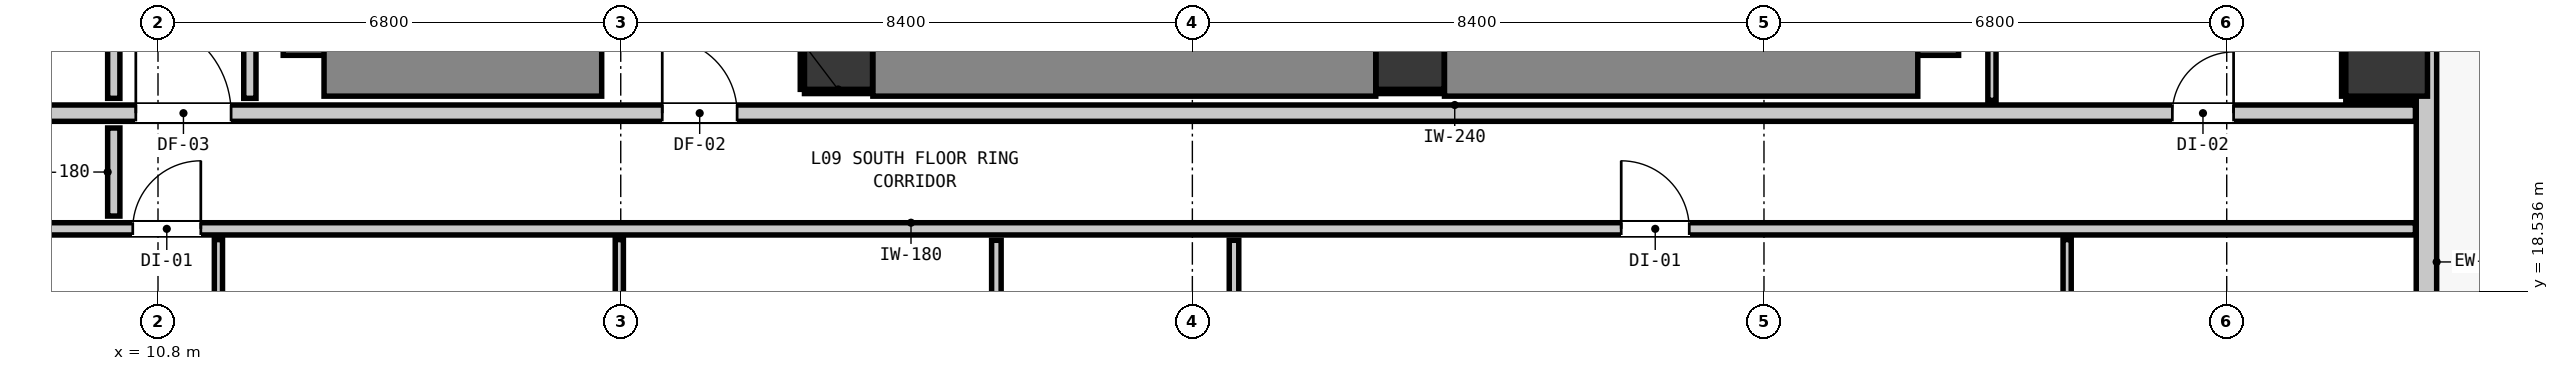
"""IFC4 building model, lengths in metres.
Left out: names, types, materials, properties, quantities, classifications, styles, units other than length and angle.
Written with IfcOpenShell. Run it as: python <this file> out.ifc"""

import sys

from ifc_helpers import new_model, si_unit, direction, frame, frame_2d, origin, origin_2d, place, context, subcontext, project, spatial, rectangle, extrude, element, fill, save


model = new_model("IFC4")
c1 = context("Model", 3, precision=1e-05, world=origin(), true_north=direction((0.0, 1.0)))
c2 = subcontext(c1, "Body", "Model", "MODEL_VIEW")
j1 = project(units=[si_unit("LENGTHUNIT", "METRE"), si_unit("PLANEANGLEUNIT", "RADIAN")], contexts=[c1])
p1 = place(None, origin())
s1 = spatial("IfcSite", under=j1, at=p1, CompositionType="ELEMENT")
p2 = place(p1, origin())
s2 = spatial("IfcBuilding", under=s1, at=p2, CompositionType="ELEMENT")
p3 = place(p2, frame((0.0, 0.0, 35.28)))
s3 = spatial("IfcBuildingStorey", under=s2, at=p3, CompositionType="ELEMENT", Elevation=35.28)
for number, where, z_axis, x_axis in (
    (1, (20.8, 22.0, 0.0), (0.0, 0.0, 1.0), (1.0, 0.0, 0.0)),
    (2, (29.2, 22.0, 0.0), (0.0, 0.0, 1.0), (1.0, 0.0, 0.0)),
):
    element("IfcColumn", number, at=place(p3, frame(where, z_axis=z_axis, x_axis=x_axis)), inside=s3, PredefinedType="COLUMN", context=c2, shape_type="SweptSolid", body=[
        extrude(rectangle(XDim=1.0, YDim=1.0, at=origin_2d()), origin(), (0.0, 0.0, 1.0), 3.32),
    ])
p4 = place(p3, frame((13.24, 22.0, 0.0), z_axis=(0.0, 0.0, 1.0), x_axis=(0.0, 1.0, 0.0)))
e3 = element("IfcWall", 3, at=p4, inside=s3, PredefinedType="SHEAR", context=c2, shape_type="SweptSolid", body=[
    extrude(rectangle(XDim=8.195, YDim=1.2, at=frame_2d((4.098, 0.0))), origin(), (0.0, 0.0, 1.0), 3.32),
])
p5 = place(p3, frame((13.24, 22.0, 0.0), z_axis=(0.0, 0.0, 1.0), x_axis=(1.0, 0.0, 0.0)))
e4 = element("IfcWall", 4, at=p5, inside=s3, PredefinedType="SHEAR", context=c2, shape_type="SweptSolid", body=[
    extrude(rectangle(XDim=4.08, YDim=1.2, at=frame_2d((2.04, 0.0))), origin(), (0.0, 0.0, 1.0), 3.32),
])
p6 = place(p3, frame((36.66, 22.0, 0.0), z_axis=(0.0, 0.0, 1.0), x_axis=(0.0, 1.0, 0.0)))
e5 = element("IfcWall", 5, at=p6, inside=s3, PredefinedType="SHEAR", context=c2, shape_type="SweptSolid", body=[
    extrude(rectangle(XDim=8.195, YDim=1.2, at=frame_2d((4.098, 0.0))), origin(), (0.0, 0.0, 1.0), 3.32),
])
p7 = place(p3, frame((29.705, 22.0, 0.0), z_axis=(0.0, 0.0, 1.0), x_axis=(1.0, 0.0, 0.0)))
e6 = element("IfcWall", 6, at=p7, inside=s3, PredefinedType="SHEAR", context=c2, shape_type="SweptSolid", body=[
    extrude(rectangle(XDim=6.955, YDim=1.2, at=frame_2d((3.478, 0.0))), origin(), (0.0, 0.0, 1.0), 3.32),
])
p8 = place(p3, frame((21.305, 22.0, 0.0), z_axis=(0.0, 0.0, 1.0), x_axis=(1.0, 0.0, 0.0)))
e7 = element("IfcWall", 7, at=p8, inside=s3, PredefinedType="SHEAR", context=c2, shape_type="SweptSolid", body=[
    extrude(rectangle(XDim=7.39, YDim=1.2, at=frame_2d((3.695, 0.0))), origin(), (0.0, 0.0, 1.0), 3.32),
])
p9 = place(p3, frame((43.55, 22.0, 0.0), z_axis=(0.0, 0.0, 1.0), x_axis=(1.0, 0.0, 0.0)))
e8 = element("IfcColumn", 8, at=p9, inside=s3, PredefinedType="COLUMN", context=c2, shape_type="SweptSolid", body=[
    extrude(rectangle(XDim=1.2, YDim=1.2, at=origin_2d()), origin(), (0.0, 0.0, 1.0), 3.32),
])
p10 = place(p3, frame((44.135, 44.835, 0.0), z_axis=(0.0, 0.0, 1.0), x_axis=(0.0, -1.0, 0.0)))
e9 = element("IfcWall", 9, at=p10, inside=s3, PredefinedType="STANDARD", context=c2, shape_type="SweptSolid", body=[
    extrude(rectangle(XDim=34.67, YDim=0.3, at=frame_2d((17.335, 0.0))), origin(), (0.0, 0.0, 1.0), 3.06),
])
p11 = place(p10, frame((1.251, 0.0, 0.0)))
e10 = element("IfcOpeningElement", 10, at=p11, cuts=e9, PredefinedType="OPENING", context=c2, shape_type="SweptSolid", body=[
    extrude(rectangle(XDim=1.0, YDim=2.15, at=frame_2d((0.5, 1.075))), frame((0.0, 0.16, 0.0), z_axis=(0.0, -1.0, 0.0), x_axis=(1.0, 0.0, 0.0)), (0.0, 0.0, 1.0), 0.32),
])
p12 = place(p10, frame((32.708, 0.0, 0.85)))
e11 = element("IfcOpeningElement", 11, at=p12, cuts=e9, PredefinedType="OPENING", context=c2, shape_type="SweptSolid", body=[
    extrude(rectangle(XDim=1.1, YDim=2.05, at=frame_2d((0.55, 1.025))), frame((0.0, 0.16, 0.0), z_axis=(0.0, -1.0, 0.0), x_axis=(1.0, 0.0, 0.0)), (0.0, 0.0, 1.0), 0.32),
])
p13 = place(p10, frame((17.935, 0.0, 0.85)))
e12 = element("IfcOpeningElement", 12, at=p13, cuts=e9, PredefinedType="OPENING", context=c2, shape_type="SweptSolid", body=[
    extrude(rectangle(XDim=1.1, YDim=2.05, at=frame_2d((0.55, 1.025))), frame((0.0, 0.16, 0.0), z_axis=(0.0, -1.0, 0.0), x_axis=(1.0, 0.0, 0.0)), (0.0, 0.0, 1.0), 0.32),
])
p14 = place(p10, frame((6.959, 0.0, 0.85)))
e13 = element("IfcOpeningElement", 13, at=p14, cuts=e9, PredefinedType="OPENING", context=c2, shape_type="SweptSolid", body=[
    extrude(rectangle(XDim=1.1, YDim=2.05, at=frame_2d((0.55, 1.025))), frame((0.0, 0.16, 0.0), z_axis=(0.0, -1.0, 0.0), x_axis=(1.0, 0.0, 0.0)), (0.0, 0.0, 1.0), 0.32),
])
p15 = place(p3, frame((1.827, 21.15, 0.0), z_axis=(0.0, 0.0, 1.0), x_axis=(1.0, 0.0, 0.0)))
e14 = element("IfcWall", 14, at=p15, inside=s3, PredefinedType="PARTITIONING", context=c2, shape_type="SweptSolid", body=[
    extrude(rectangle(XDim=42.146, YDim=0.24, at=frame_2d((21.073, 0.0))), origin(), (0.0, 0.0, 1.0), 3.06),
])
p16 = place(p15, frame((16.383, 0.0, 0.0)))
e15 = element("IfcOpeningElement", 15, at=p16, cuts=e14, PredefinedType="OPENING", context=c2, shape_type="SweptSolid", body=[
    extrude(rectangle(XDim=1.1, YDim=2.15, at=frame_2d((0.55, 1.075))), frame((0.0, 0.13, 0.0), z_axis=(0.0, -1.0, 0.0), x_axis=(1.0, 0.0, 0.0)), (0.0, 0.0, 1.0), 0.26),
])
p17 = place(p15, frame((8.647, 0.0, 0.0)))
e16 = element("IfcOpeningElement", 16, at=p17, cuts=e14, PredefinedType="OPENING", context=c2, shape_type="SweptSolid", body=[
    extrude(rectangle(XDim=1.4, YDim=2.15, at=frame_2d((0.7, 1.075))), frame((0.0, 0.13, 0.0), z_axis=(0.0, -1.0, 0.0), x_axis=(1.0, 0.0, 0.0)), (0.0, 0.0, 1.0), 0.26),
])
p18 = place(p15, frame((38.574, 0.0, 0.0)))
e17 = element("IfcOpeningElement", 17, at=p18, cuts=e14, PredefinedType="OPENING", context=c2, shape_type="SweptSolid", body=[
    extrude(rectangle(XDim=0.9, YDim=2.1, at=frame_2d((0.45, 1.05))), frame((0.0, 0.13, 0.0), z_axis=(0.0, -1.0, 0.0), x_axis=(1.0, 0.0, 0.0)), (0.0, 0.0, 1.0), 0.26),
])
p19 = place(p3, frame((1.827, 19.45, 0.0), z_axis=(0.0, 0.0, 1.0), x_axis=(1.0, 0.0, 0.0)))
e18 = element("IfcWall", 18, at=p19, inside=s3, PredefinedType="PARTITIONING", context=c2, shape_type="SweptSolid", body=[
    extrude(rectangle(XDim=42.146, YDim=0.18, at=frame_2d((21.073, 0.0))), origin(), (0.0, 0.0, 1.0), 3.06),
])
p20 = place(p19, frame((8.602, 0.0, 0.0)))
e19 = element("IfcOpeningElement", 19, at=p20, cuts=e18, PredefinedType="OPENING", context=c2, shape_type="SweptSolid", body=[
    extrude(rectangle(XDim=1.0, YDim=2.15, at=frame_2d((0.5, 1.075))), frame((0.0, 0.1, 0.0), z_axis=(0.0, -1.0, 0.0), x_axis=(1.0, 0.0, 0.0)), (0.0, 0.0, 1.0), 0.2),
])
p21 = place(p19, frame((30.475, 0.0, 0.0)))
e20 = element("IfcOpeningElement", 20, at=p21, cuts=e18, PredefinedType="OPENING", context=c2, shape_type="SweptSolid", body=[
    extrude(rectangle(XDim=1.0, YDim=2.15, at=frame_2d((0.5, 1.075))), frame((0.0, 0.1, 0.0), z_axis=(0.0, -1.0, 0.0), x_axis=(1.0, 0.0, 0.0)), (0.0, 0.0, 1.0), 0.2),
])
p22 = place(p3, frame((10.15, 19.638, 0.0), z_axis=(0.0, 0.0, 1.0), x_axis=(0.0, 1.0, 0.0)))
e21 = element("IfcWall", 21, at=p22, inside=s3, PredefinedType="PARTITIONING", context=c2, shape_type="SweptSolid", body=[
    extrude(rectangle(XDim=1.294, YDim=0.18, at=frame_2d((0.647, 0.0))), origin(), (0.0, 0.0, 1.0), 3.06),
])
p23 = place(p3, frame((10.15, 21.368, 0.0), z_axis=(0.0, 0.0, 1.0), x_axis=(0.0, 1.0, 0.0)))
e22 = element("IfcWall", 22, at=p23, inside=s3, PredefinedType="PARTITIONING", context=c2, shape_type="SweptSolid", body=[
    extrude(rectangle(XDim=5.354, YDim=0.18, at=frame_2d((2.677, 0.0))), origin(), (0.0, 0.0, 1.0), 3.06),
])
p24 = place(p3, frame((12.15, 21.368, 0.0), z_axis=(0.0, 0.0, 1.0), x_axis=(0.0, 1.0, 0.0)))
e23 = element("IfcWall", 23, at=p24, inside=s3, PredefinedType="PARTITIONING", context=c2, shape_type="SweptSolid", body=[
    extrude(rectangle(XDim=18.694, YDim=0.18, at=frame_2d((9.347, 0.0))), origin(), (0.0, 0.0, 1.0), 3.06),
])
p25 = place(p3, frame((23.12, 13.148, 0.0), z_axis=(0.0, 0.0, 1.0), x_axis=(0.0, 1.0, 0.0)))
e24 = element("IfcWall", 24, at=p25, inside=s3, PredefinedType="PARTITIONING", context=c2, shape_type="SweptSolid", body=[
    extrude(rectangle(XDim=6.134, YDim=0.14, at=frame_2d((3.067, 0.0))), origin(), (0.0, 0.0, 1.0), 3.06),
])
p26 = place(p3, frame((26.612, 13.148, 0.0), z_axis=(0.0, 0.0, 1.0), x_axis=(0.0, 1.0, 0.0)))
e25 = element("IfcWall", 25, at=p26, inside=s3, PredefinedType="PARTITIONING", context=c2, shape_type="SweptSolid", body=[
    extrude(rectangle(XDim=6.134, YDim=0.14, at=frame_2d((3.067, 0.0))), origin(), (0.0, 0.0, 1.0), 3.06),
])
p27 = place(p26, frame((2.647, 0.0, 0.0)))
e26 = element("IfcOpeningElement", 26, at=p27, cuts=e25, PredefinedType="OPENING", context=c2, shape_type="SweptSolid", body=[
    extrude(rectangle(XDim=0.86, YDim=2.02, at=frame_2d((0.43, 1.01))), frame((0.0, 0.08, 0.0), z_axis=(0.0, -1.0, 0.0), x_axis=(1.0, 0.0, 0.0)), (0.0, 0.0, 1.0), 0.16),
])
p28 = place(p3, frame((11.688, 13.138, 0.0), z_axis=(0.0, 0.0, 1.0), x_axis=(0.0, 1.0, 0.0)))
e27 = element("IfcWall", 27, at=p28, inside=s3, PredefinedType="PARTITIONING", context=c2, shape_type="SweptSolid", body=[
    extrude(rectangle(XDim=6.154, YDim=0.12, at=frame_2d((3.077, 0.0))), origin(), (0.0, 0.0, 1.0), 3.06),
])
p29 = place(p28, frame((2.624, 0.0, 0.0)))
e28 = element("IfcOpeningElement", 28, at=p29, cuts=e27, PredefinedType="OPENING", context=c2, shape_type="SweptSolid", body=[
    extrude(rectangle(XDim=0.9, YDim=2.1, at=frame_2d((0.45, 1.05))), frame((0.0, 0.07, 0.0), z_axis=(0.0, -1.0, 0.0), x_axis=(1.0, 0.0, 0.0)), (0.0, 0.0, 1.0), 0.14),
])
p30 = place(p3, frame((17.579, 13.138, 0.0), z_axis=(0.0, 0.0, 1.0), x_axis=(0.0, 1.0, 0.0)))
e29 = element("IfcWall", 29, at=p30, inside=s3, PredefinedType="PARTITIONING", context=c2, shape_type="SweptSolid", body=[
    extrude(rectangle(XDim=6.154, YDim=0.12, at=frame_2d((3.077, 0.0))), origin(), (0.0, 0.0, 1.0), 3.06),
])
p31 = place(p30, frame((2.637, 0.0, 0.0)))
e30 = element("IfcOpeningElement", 30, at=p31, cuts=e29, PredefinedType="OPENING", context=c2, shape_type="SweptSolid", body=[
    extrude(rectangle(XDim=0.9, YDim=2.1, at=frame_2d((0.45, 1.05))), frame((0.0, 0.07, 0.0), z_axis=(0.0, -1.0, 0.0), x_axis=(1.0, 0.0, 0.0)), (0.0, 0.0, 1.0), 0.14),
])
p32 = place(p3, frame((37.75, 21.338, 0.0), z_axis=(0.0, 0.0, 1.0), x_axis=(0.0, 1.0, 0.0)))
e31 = element("IfcWall", 31, at=p32, inside=s3, PredefinedType="PARTITIONING", context=c2, shape_type="SweptSolid", body=[
    extrude(rectangle(XDim=10.124, YDim=0.12, at=frame_2d((5.062, 0.0))), origin(), (0.0, 0.0, 1.0), 3.06),
])
p33 = place(p3, frame((38.855, 13.138, 0.0), z_axis=(0.0, 0.0, 1.0), x_axis=(0.0, 1.0, 0.0)))
e32 = element("IfcWall", 32, at=p33, inside=s3, PredefinedType="PARTITIONING", context=c2, shape_type="SweptSolid", body=[
    extrude(rectangle(XDim=6.154, YDim=0.12, at=frame_2d((3.077, 0.0))), origin(), (0.0, 0.0, 1.0), 2.445),
])
p34 = place(p33, frame((2.637, 0.0, 0.0)))
e33 = element("IfcOpeningElement", 33, at=p34, cuts=e32, PredefinedType="OPENING", context=c2, shape_type="SweptSolid", body=[
    extrude(rectangle(XDim=0.9, YDim=2.1, at=frame_2d((0.45, 1.05))), frame((0.0, 0.07, 0.0), z_axis=(0.0, -1.0, 0.0), x_axis=(1.0, 0.0, 0.0)), (0.0, 0.0, 1.0), 0.14),
])
p35 = place(p3, frame((20.3, 21.468, 0.0), z_axis=(0.0, 0.0, 1.0), x_axis=(1.0, 0.0, 0.0)))
e34 = element("IfcWall", 34, at=p35, inside=s3, PredefinedType="PARTITIONING", context=c2, shape_type="SweptSolid", body=[
    extrude(rectangle(XDim=0.99, YDim=0.06, at=frame_2d((0.495, 0.0))), origin(), (0.0, 0.0, 1.0), 1.45),
])
p36 = place(p3, frame((20.268, 21.5, 0.0), z_axis=(0.0, 0.0, 1.0), x_axis=(0.0, 1.0, 0.0)))
e35 = element("IfcWall", 35, at=p36, inside=s3, PredefinedType="PARTITIONING", context=c2, shape_type="SweptSolid", body=[
    extrude(rectangle(XDim=1.0, YDim=0.06, at=frame_2d((0.5, 0.0))), origin(), (0.0, 0.0, 1.0), 1.45),
])
p37 = place(p3, frame((28.71, 21.468, 0.0), z_axis=(0.0, 0.0, 1.0), x_axis=(1.0, 0.0, 0.0)))
e36 = element("IfcWall", 36, at=p37, inside=s3, PredefinedType="PARTITIONING", context=c2, shape_type="SweptSolid", body=[
    extrude(rectangle(XDim=0.98, YDim=0.06, at=frame_2d((0.49, 0.0))), origin(), (0.0, 0.0, 1.0), 1.45),
])
p38 = place(p3, frame((42.95, 21.368, 0.0), z_axis=(0.0, 0.0, 1.0), x_axis=(1.0, 0.0, 0.0)))
e37 = element("IfcWall", 37, at=p38, inside=s3, PredefinedType="PARTITIONING", context=c2, shape_type="SweptSolid", body=[
    extrude(rectangle(XDim=1.02, YDim=0.06, at=frame_2d((0.51, 0.0))), origin(), (0.0, 0.0, 1.0), 1.45),
])
p39 = place(p3, frame((42.918, 21.4, 0.0), z_axis=(0.0, 0.0, 1.0), x_axis=(0.0, 1.0, 0.0)))
e38 = element("IfcWall", 38, at=p39, inside=s3, PredefinedType="PARTITIONING", context=c2, shape_type="SweptSolid", body=[
    extrude(rectangle(XDim=1.2, YDim=0.06, at=frame_2d((0.6, 0.0))), origin(), (0.0, 0.0, 1.0), 1.45),
])
p40 = place(p16, origin())
e39 = element("IfcDoor", 39, at=p40, inside=s3, OperationType="SINGLE_SWING_LEFT", PredefinedType="DOOR", context=c2, shape_type="SweptSolid", body=[
    extrude(rectangle(XDim=1.1, YDim=2.15, at=frame_2d((0.55, 1.075))), frame((0.0, 0.025, 0.0), z_axis=(0.0, -1.0, 0.0), x_axis=(1.0, 0.0, 0.0)), (0.0, 0.0, 1.0), 0.05),
])
fill(e15, e39)
p41 = place(p17, origin())
e40 = element("IfcDoor", 40, at=p41, inside=s3, OperationType="SINGLE_SWING_LEFT", PredefinedType="DOOR", context=c2, shape_type="SweptSolid", body=[
    extrude(rectangle(XDim=1.4, YDim=2.15, at=frame_2d((0.7, 1.075))), frame((0.0, 0.025, 0.0), z_axis=(0.0, -1.0, 0.0), x_axis=(1.0, 0.0, 0.0)), (0.0, 0.0, 1.0), 0.05),
])
fill(e16, e40)
p42 = place(p20, origin())
e41 = element("IfcDoor", 41, at=p42, inside=s3, OperationType="SINGLE_SWING_RIGHT", PredefinedType="DOOR", context=c2, shape_type="SweptSolid", body=[
    extrude(rectangle(XDim=1.0, YDim=2.15, at=frame_2d((0.5, 1.075))), frame((0.0, 0.025, 0.0), z_axis=(0.0, -1.0, 0.0), x_axis=(1.0, 0.0, 0.0)), (0.0, 0.0, 1.0), 0.05),
])
fill(e19, e41)
p43 = place(p21, origin())
e42 = element("IfcDoor", 42, at=p43, inside=s3, OperationType="SINGLE_SWING_LEFT", PredefinedType="DOOR", context=c2, shape_type="SweptSolid", body=[
    extrude(rectangle(XDim=1.0, YDim=2.15, at=frame_2d((0.5, 1.075))), frame((0.0, 0.025, 0.0), z_axis=(0.0, -1.0, 0.0), x_axis=(1.0, 0.0, 0.0)), (0.0, 0.0, 1.0), 0.05),
])
fill(e20, e42)
p44 = place(p18, origin())
e43 = element("IfcDoor", 43, at=p44, inside=s3, OperationType="SINGLE_SWING_RIGHT", PredefinedType="DOOR", context=c2, shape_type="SweptSolid", body=[
    extrude(rectangle(XDim=0.9, YDim=2.1, at=frame_2d((0.45, 1.05))), frame((0.0, 0.025, 0.0), z_axis=(0.0, -1.0, 0.0), x_axis=(1.0, 0.0, 0.0)), (0.0, 0.0, 1.0), 0.05),
])
fill(e17, e43)
save(model, sys.argv[1])
